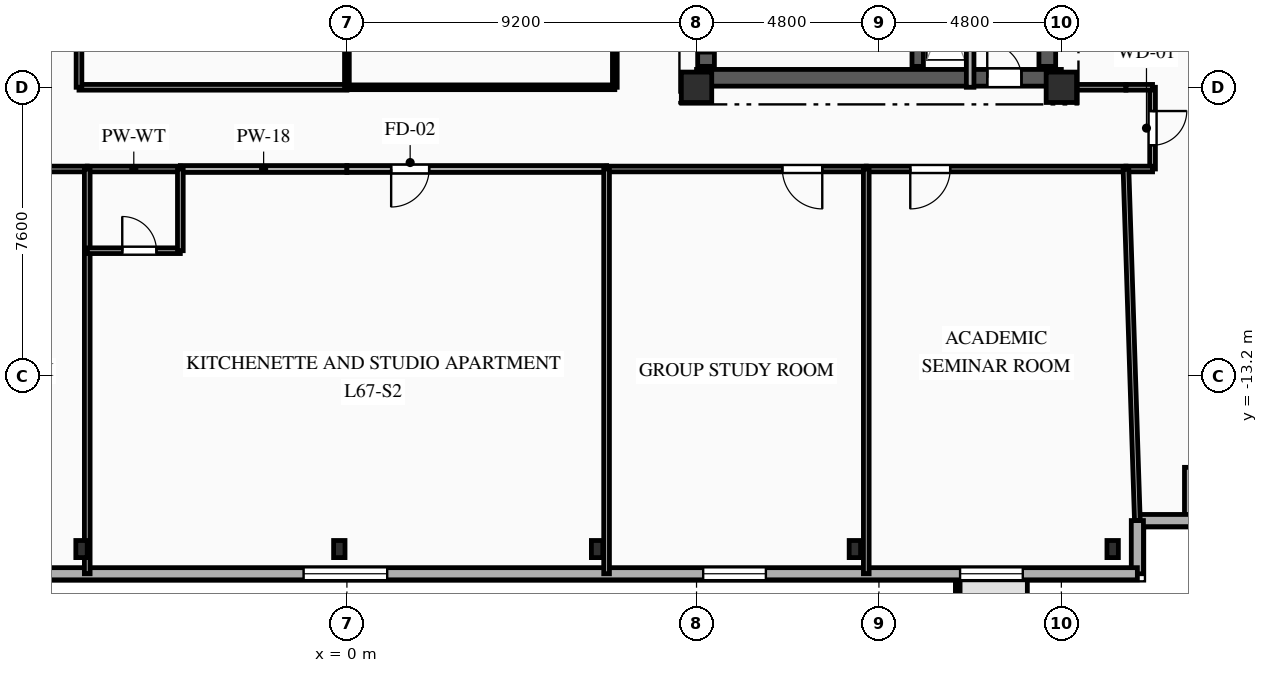
"""IFC4 building model, lengths in metres.
Left out: names, types, materials, properties, quantities, classifications, styles, units other than length and angle.
Written with IfcOpenShell. Run it as: python <this file> out.ifc"""

import sys

from ifc_helpers import new_model, si_unit, direction, frame, frame_2d, origin, origin_2d, place, context, subcontext, project, spatial, rectangle, i_section, extrude, element, fill, save


model = new_model("IFC4")
c1 = context("Model", 3, precision=1e-05, world=origin(), true_north=direction((0.0, 1.0)))
c2 = subcontext(c1, "Body", "Model", "MODEL_VIEW")
j1 = project(units=[si_unit("LENGTHUNIT", "METRE"), si_unit("PLANEANGLEUNIT", "RADIAN")], contexts=[c1])
p1 = place(None, origin())
s1 = spatial("IfcSite", under=j1, at=p1, CompositionType="ELEMENT")
p2 = place(p1, origin())
s2 = spatial("IfcBuilding", under=s1, at=p2, CompositionType="ELEMENT")
p3 = place(p2, frame((0.0, 0.0, 238.35)))
s3 = spatial("IfcBuildingStorey", under=s2, at=p3, CompositionType="ELEMENT", Elevation=238.35)
for number, where, z_axis, x_axis in (
    (1, (9.2, -5.6, 0.0), (0.0, 0.0, 1.0), (1.0, 0.0, 0.0)),
    (2, (18.8, -5.6, 0.0), (0.0, 0.0, 1.0), (1.0, 0.0, 0.0)),
):
    element("IfcColumn", number, at=place(p3, frame(where, z_axis=z_axis, x_axis=x_axis)), inside=s3, PredefinedType="COLUMN", context=c2, shape_type="SweptSolid", body=[
        extrude(rectangle(XDim=0.8, YDim=0.8, at=origin_2d()), origin(), (0.0, 0.0, 1.0), 3.35),
    ])
for number, where, z_axis, x_axis in (
    (3, (-6.983, -17.75, 0.0), (0.0, 0.0, 1.0), (1.0, 0.0, 0.0)),
    (4, (-0.2, -17.75, 0.0), (0.0, 0.0, 1.0), (1.0, 0.0, 0.0)),
    (5, (6.583, -17.75, 0.0), (0.0, 0.0, 1.0), (1.0, 0.0, 0.0)),
    (6, (13.367, -17.75, 0.0), (0.0, 0.0, 1.0), (1.0, 0.0, 0.0)),
    (7, (20.15, -17.75, 0.0), (0.0, 0.0, 1.0), (1.0, 0.0, 0.0)),
):
    element("IfcColumn", number, at=place(p3, frame(where, z_axis=z_axis, x_axis=x_axis)), inside=s3, PredefinedType="COLUMN", context=c2, shape_type="SweptSolid", body=[
        extrude(i_section(OverallWidth=0.3, OverallDepth=0.45, WebThickness=0.014, FlangeThickness=0.026, FilletRadius=0.027, at=origin_2d()), origin(), (0.0, 0.0, 1.0), 3.35),
    ])
for number, where, z_axis, x_axis in (
    (8, (22.2, -15.6, 0.0), (0.0, 0.0, 1.0), (0.0, -1.0, 0.0)),
    (9, (22.2, -17.0, 0.0), (0.0, 0.0, 1.0), (-1.0, 0.0, 0.0)),
    (10, (20.8, -17.0, 0.0), (0.0, 0.0, 1.0), (0.0, -1.0, 0.0)),
):
    element("IfcWall", number, at=place(p3, frame(where, z_axis=z_axis, x_axis=x_axis)), inside=s3, PredefinedType="SOLIDWALL", context=c2, shape_type="SweptSolid", body=[
        extrude(rectangle(XDim=1.4, YDim=0.32, at=frame_2d((0.7, 0.0))), origin(), (0.0, 0.0, 1.0), 3.04),
    ])
p4 = place(p3, frame((20.8, -18.4, 0.0), z_axis=(0.0, 0.0, 1.0), x_axis=(-1.0, 0.0, 0.0)))
e11 = element("IfcWall", 11, at=p4, inside=s3, PredefinedType="SOLIDWALL", context=c2, shape_type="SweptSolid", body=[
    extrude(rectangle(XDim=42.0, YDim=0.32, at=frame_2d((21.0, 0.0))), origin(), (0.0, 0.0, 1.0), 3.04),
])
p5 = place(p4, frame((3.015, 0.0, 0.85)))
e12 = element("IfcOpeningElement", 12, at=p5, cuts=e11, PredefinedType="OPENING", context=c2, shape_type="SweptSolid", body=[
    extrude(rectangle(XDim=1.65, YDim=1.85, at=frame_2d((0.825, 0.925))), frame((0.0, 0.17, 0.0), z_axis=(0.0, -1.0, 0.0), x_axis=(1.0, 0.0, 0.0)), (0.0, 0.0, 1.0), 0.34),
])
p6 = place(p4, frame((9.775, 0.0, 0.85)))
e13 = element("IfcOpeningElement", 13, at=p6, cuts=e11, PredefinedType="OPENING", context=c2, shape_type="SweptSolid", body=[
    extrude(rectangle(XDim=1.65, YDim=1.85, at=frame_2d((0.825, 0.925))), frame((0.0, 0.17, 0.0), z_axis=(0.0, -1.0, 0.0), x_axis=(1.0, 0.0, 0.0)), (0.0, 0.0, 1.0), 0.34),
])
p7 = place(p4, frame((19.74, 0.0, 0.85)))
e14 = element("IfcOpeningElement", 14, at=p7, cuts=e11, PredefinedType="OPENING", context=c2, shape_type="SweptSolid", body=[
    extrude(rectangle(XDim=2.2, YDim=1.85, at=frame_2d((1.1, 0.925))), frame((0.0, 0.17, 0.0), z_axis=(0.0, -1.0, 0.0), x_axis=(1.0, 0.0, 0.0)), (0.0, 0.0, 1.0), 0.34),
])
p8 = place(p4, frame((30.255, 0.0, 0.85)))
e15 = element("IfcOpeningElement", 15, at=p8, cuts=e11, PredefinedType="OPENING", context=c2, shape_type="SweptSolid", body=[
    extrude(rectangle(XDim=1.65, YDim=1.85, at=frame_2d((0.825, 0.925))), frame((0.0, 0.17, 0.0), z_axis=(0.0, -1.0, 0.0), x_axis=(1.0, 0.0, 0.0)), (0.0, 0.0, 1.0), 0.34),
])
p9 = place(p4, frame((37.095, 0.0, 0.85)))
e16 = element("IfcOpeningElement", 16, at=p9, cuts=e11, PredefinedType="OPENING", context=c2, shape_type="SweptSolid", body=[
    extrude(rectangle(XDim=1.65, YDim=1.85, at=frame_2d((0.825, 0.925))), frame((0.0, 0.17, 0.0), z_axis=(0.0, -1.0, 0.0), x_axis=(1.0, 0.0, 0.0)), (0.0, 0.0, 1.0), 0.34),
])
p10 = place(p3, frame((9.2, -5.35, 0.0), z_axis=(0.0, 0.0, 1.0), x_axis=(1.0, 0.0, 0.0)))
e17 = element("IfcWall", 17, at=p10, inside=s3, PredefinedType="SHEAR", context=c2, shape_type="SweptSolid", body=[
    extrude(rectangle(XDim=9.6, YDim=0.44, at=frame_2d((4.8, 0.0))), origin(), (0.0, 0.0, 1.0), 3.04),
])
p11 = place(p10, frame((7.65, 0.0, 0.0)))
e18 = element("IfcOpeningElement", 18, at=p11, cuts=e17, PredefinedType="OPENING", context=c2, shape_type="SweptSolid", body=[
    extrude(rectangle(XDim=0.9, YDim=2.1, at=frame_2d((0.45, 1.05))), frame((0.0, 0.23, 0.0), z_axis=(0.0, -1.0, 0.0), x_axis=(1.0, 0.0, 0.0)), (0.0, 0.0, 1.0), 0.46),
])
p12 = place(p3, frame((9.45, -5.05, 0.0), z_axis=(0.0, 0.0, 1.0), x_axis=(0.0, 1.0, 0.0)))
e19 = element("IfcWall", 19, at=p12, inside=s3, PredefinedType="SHEAR", context=c2, shape_type="SweptSolid", body=[
    extrude(rectangle(XDim=10.1, YDim=0.44, at=frame_2d((5.05, 0.0))), origin(), (0.0, 0.0, 1.0), 3.04),
])
p13 = place(p12, frame((7.15, 0.0, 0.0)))
e20 = element("IfcOpeningElement", 20, at=p13, cuts=e19, PredefinedType="OPENING", context=c2, shape_type="SweptSolid", body=[
    extrude(rectangle(XDim=0.9, YDim=2.1, at=frame_2d((0.45, 1.05))), frame((0.0, 0.23, 0.0), z_axis=(0.0, -1.0, 0.0), x_axis=(1.0, 0.0, 0.0)), (0.0, 0.0, 1.0), 0.46),
])
p14 = place(p12, frame((2.4, 0.0, 0.0)))
e21 = element("IfcOpeningElement", 21, at=p14, cuts=e19, PredefinedType="OPENING", context=c2, shape_type="SweptSolid", body=[
    extrude(rectangle(XDim=1.2, YDim=2.15, at=frame_2d((0.6, 1.075))), frame((0.0, 0.23, 0.0), z_axis=(0.0, -1.0, 0.0), x_axis=(1.0, 0.0, 0.0)), (0.0, 0.0, 1.0), 0.46),
])
p15 = place(p12, frame((0.35, 0.0, 0.0)))
e22 = element("IfcOpeningElement", 22, at=p15, cuts=e19, PredefinedType="OPENING", context=c2, shape_type="SweptSolid", body=[
    extrude(rectangle(XDim=0.9, YDim=2.1, at=frame_2d((0.45, 1.05))), frame((0.0, 0.23, 0.0), z_axis=(0.0, -1.0, 0.0), x_axis=(1.0, 0.0, 0.0)), (0.0, 0.0, 1.0), 0.46),
])
p16 = place(p3, frame((18.43, -5.05, 0.0), z_axis=(0.0, 0.0, 1.0), x_axis=(0.0, 1.0, 0.0)))
e23 = element("IfcWall", 23, at=p16, inside=s3, PredefinedType="SHEAR", context=c2, shape_type="SweptSolid", body=[
    extrude(rectangle(XDim=10.1, YDim=0.44, at=frame_2d((5.05, 0.0))), origin(), (0.0, 0.0, 1.0), 3.04),
])
p17 = place(p3, frame((15.02, -5.05, 0.0), z_axis=(0.0, 0.0, 1.0), x_axis=(0.0, 1.0, 0.0)))
e24 = element("IfcWall", 24, at=p17, inside=s3, PredefinedType="SHEAR", context=c2, shape_type="SweptSolid", body=[
    extrude(rectangle(XDim=10.1, YDim=0.3, at=frame_2d((5.05, 0.0))), origin(), (0.0, 0.0, 1.0), 3.04),
])
p18 = place(p3, frame((16.4, -2.11, 0.0), z_axis=(0.0, 0.0, 1.0), x_axis=(0.0, -1.0, 0.0)))
e25 = element("IfcWall", 25, at=p18, inside=s3, PredefinedType="PARTITIONING", context=c2, shape_type="SweptSolid", body=[
    extrude(rectangle(XDim=3.49, YDim=0.2, at=frame_2d((1.745, 0.0))), origin(), (0.0, 0.0, 1.0), 3.04),
])
p19 = place(p3, frame((-6.833, -7.75, 0.0), z_axis=(0.0, 0.0, 1.0), x_axis=(-1.0, 0.0, 0.0)))
e26 = element("IfcWall", 26, at=p19, inside=s3, PredefinedType="PARTITIONING", context=c2, shape_type="SweptSolid", body=[
    extrude(rectangle(XDim=6.833, YDim=0.15, at=frame_2d((3.417, 0.0))), origin(), (0.0, 0.0, 1.0), 3.04),
])
p20 = place(p19, frame((4.625, 0.0, 0.0)))
e27 = element("IfcOpeningElement", 27, at=p20, cuts=e26, PredefinedType="OPENING", context=c2, shape_type="SweptSolid", body=[
    extrude(rectangle(XDim=1.05, YDim=2.15, at=frame_2d((0.525, 1.075))), frame((0.0, 0.085, 0.0), z_axis=(0.0, -1.0, 0.0), x_axis=(1.0, 0.0, 0.0)), (0.0, 0.0, 1.0), 0.17),
])
p21 = place(p3, frame((0.0, -7.75, 0.0), z_axis=(0.0, 0.0, 1.0), x_axis=(-1.0, 0.0, 0.0)))
e28 = element("IfcWall", 28, at=p21, inside=s3, PredefinedType="PARTITIONING", context=c2, shape_type="SweptSolid", body=[
    extrude(rectangle(XDim=4.383, YDim=0.18, at=frame_2d((2.191, 0.0))), origin(), (0.0, 0.0, 1.0), 3.04),
])
p22 = place(p3, frame((-4.383, -7.75, 0.0), z_axis=(0.0, 0.0, 1.0), x_axis=(-1.0, 0.0, 0.0)))
e29 = element("IfcWall", 29, at=p22, inside=s3, PredefinedType="PLUMBINGWALL", context=c2, shape_type="SweptSolid", body=[
    extrude(rectangle(XDim=2.45, YDim=0.15, at=frame_2d((1.225, 0.0))), origin(), (0.0, 0.0, 1.0), 3.04),
])
p23 = place(p3, frame((-7.05, -5.6, 0.0), z_axis=(0.0, 0.0, 1.0), x_axis=(1.0, 0.0, 0.0)))
e30 = element("IfcWall", 30, at=p23, inside=s3, PredefinedType="PARTITIONING", context=c2, shape_type="SweptSolid", body=[
    extrude(rectangle(XDim=7.05, YDim=0.15, at=frame_2d((3.525, 0.0))), origin(), (0.0, 0.0, 1.0), 2.525),
])
p24 = place(p3, frame((21.2, -5.6, 0.0), z_axis=(0.0, 0.0, 1.0), x_axis=(0.0, -1.0, 0.0)))
e31 = element("IfcWall", 31, at=p24, inside=s3, PredefinedType="PARTITIONING", context=c2, shape_type="SweptSolid", body=[
    extrude(rectangle(XDim=2.15, YDim=0.15, at=frame_2d((1.075, 0.0))), origin(), (0.0, 0.0, 1.0), 3.04),
])
p25 = place(p24, frame((0.625, 0.0, 0.0)))
e32 = element("IfcOpeningElement", 32, at=p25, cuts=e31, PredefinedType="OPENING", context=c2, shape_type="SweptSolid", body=[
    extrude(rectangle(XDim=0.9, YDim=2.1, at=frame_2d((0.45, 1.05))), frame((0.0, 0.085, 0.0), z_axis=(0.0, -1.0, 0.0), x_axis=(1.0, 0.0, 0.0)), (0.0, 0.0, 1.0), 0.17),
])
p26 = place(p3, frame((18.8, -5.6, 0.0), z_axis=(0.0, 0.0, 1.0), x_axis=(1.0, 0.0, 0.0)))
e33 = element("IfcWall", 33, at=p26, inside=s3, PredefinedType="PARTITIONING", context=c2, shape_type="SweptSolid", body=[
    extrude(rectangle(XDim=1.7, YDim=0.15, at=frame_2d((0.85, 0.0))), origin(), (0.0, 0.0, 1.0), 3.04),
])
for number, where, z_axis, x_axis in (
    (34, (20.5, -5.6, 0.0), (0.0, 0.0, 1.0), (1.0, 0.0, 0.0)),
    (35, (21.2, -7.75, 0.0), (0.0, 0.0, 1.0), (-1.0, 0.0, 0.0)),
):
    element("IfcWall", number, at=place(p3, frame(where, z_axis=z_axis, x_axis=x_axis)), inside=s3, PredefinedType="PARTITIONING", context=c2, shape_type="SweptSolid", body=[
        extrude(rectangle(XDim=0.7, YDim=0.15, at=frame_2d((0.35, 0.0))), origin(), (0.0, 0.0, 1.0), 3.04),
    ])
p27 = place(p3, frame((6.833, -7.75, 0.0), z_axis=(0.0, 0.0, 1.0), x_axis=(-1.0, 0.0, 0.0)))
e36 = element("IfcWall", 36, at=p27, inside=s3, PredefinedType="PARTITIONING", context=c2, shape_type="SweptSolid", body=[
    extrude(rectangle(XDim=6.833, YDim=0.18, at=frame_2d((3.417, 0.0))), origin(), (0.0, 0.0, 1.0), 3.04),
])
p28 = place(p27, frame((4.669, 0.0, 0.0)))
e37 = element("IfcOpeningElement", 37, at=p28, cuts=e36, PredefinedType="OPENING", context=c2, shape_type="SweptSolid", body=[
    extrude(rectangle(XDim=1.0, YDim=2.15, at=frame_2d((0.5, 1.075))), frame((0.0, 0.1, 0.0), z_axis=(0.0, -1.0, 0.0), x_axis=(1.0, 0.0, 0.0)), (0.0, 0.0, 1.0), 0.2),
])
p29 = place(p3, frame((13.667, -7.75, 0.0), z_axis=(0.0, 0.0, 1.0), x_axis=(-1.0, 0.0, 0.0)))
e38 = element("IfcWall", 38, at=p29, inside=s3, PredefinedType="PARTITIONING", context=c2, shape_type="SweptSolid", body=[
    extrude(rectangle(XDim=6.833, YDim=0.15, at=frame_2d((3.417, 0.0))), origin(), (0.0, 0.0, 1.0), 3.04),
])
p30 = place(p29, frame((1.158, 0.0, 0.0)))
e39 = element("IfcOpeningElement", 39, at=p30, cuts=e38, PredefinedType="OPENING", context=c2, shape_type="SweptSolid", body=[
    extrude(rectangle(XDim=1.05, YDim=2.15, at=frame_2d((0.525, 1.075))), frame((0.0, 0.085, 0.0), z_axis=(0.0, -1.0, 0.0), x_axis=(1.0, 0.0, 0.0)), (0.0, 0.0, 1.0), 0.17),
])
p31 = place(p3, frame((20.5, -7.75, 0.0), z_axis=(0.0, 0.0, 1.0), x_axis=(-1.0, 0.0, 0.0)))
e40 = element("IfcWall", 40, at=p31, inside=s3, PredefinedType="PARTITIONING", context=c2, shape_type="SweptSolid", body=[
    extrude(rectangle(XDim=6.833, YDim=0.15, at=frame_2d((3.417, 0.0))), origin(), (0.0, 0.0, 1.0), 3.04),
])
p32 = place(p31, frame((4.625, 0.0, 0.0)))
e41 = element("IfcOpeningElement", 41, at=p32, cuts=e40, PredefinedType="OPENING", context=c2, shape_type="SweptSolid", body=[
    extrude(rectangle(XDim=1.05, YDim=2.15, at=frame_2d((0.525, 1.075))), frame((0.0, 0.085, 0.0), z_axis=(0.0, -1.0, 0.0), x_axis=(1.0, 0.0, 0.0)), (0.0, 0.0, 1.0), 0.17),
])
p33 = place(p3, frame((0.0, -5.6, 0.0), z_axis=(0.0, 0.0, 1.0), x_axis=(1.0, 0.0, 0.0)))
e42 = element("IfcWall", 42, at=p33, inside=s3, PredefinedType="PARTITIONING", context=c2, shape_type="SweptSolid", body=[
    extrude(rectangle(XDim=7.05, YDim=0.125, at=frame_2d((3.525, 0.0))), origin(), (0.0, 0.0, 1.0), 2.525),
])
p34 = place(p3, frame((-7.05, 8.5, 0.0), z_axis=(0.0, 0.0, 1.0), x_axis=(0.0, -1.0, 0.0)))
e43 = element("IfcWall", 43, at=p34, inside=s3, PredefinedType="PARTITIONING", context=c2, shape_type="SweptSolid", body=[
    extrude(rectangle(XDim=14.1, YDim=0.15, at=frame_2d((7.05, 0.0))), origin(), (0.0, 0.0, 1.0), 3.04),
])
p35 = place(p34, frame((8.074, 0.0, 0.0)))
e44 = element("IfcOpeningElement", 44, at=p35, cuts=e43, PredefinedType="OPENING", context=c2, shape_type="SweptSolid", body=[
    extrude(rectangle(XDim=0.95, YDim=2.1, at=frame_2d((0.475, 1.05))), frame((0.0, 0.085, 0.0), z_axis=(0.0, -1.0, 0.0), x_axis=(1.0, 0.0, 0.0)), (0.0, 0.0, 1.0), 0.17),
])
p36 = place(p3, frame((7.05, -5.6, 0.0), z_axis=(0.0, 0.0, 1.0), x_axis=(0.0, 1.0, 0.0)))
e45 = element("IfcWall", 45, at=p36, inside=s3, PredefinedType="PARTITIONING", context=c2, shape_type="SweptSolid", body=[
    extrude(rectangle(XDim=14.1, YDim=0.125, at=frame_2d((7.05, 0.0))), origin(), (0.0, 0.0, 1.0), 3.04),
])
p37 = place(p36, frame((5.076, 0.0, 0.0)))
e46 = element("IfcOpeningElement", 46, at=p37, cuts=e45, PredefinedType="OPENING", context=c2, shape_type="SweptSolid", body=[
    extrude(rectangle(XDim=0.95, YDim=2.1, at=frame_2d((0.475, 1.05))), frame((0.0, 0.073, 0.0), z_axis=(0.0, -1.0, 0.0), x_axis=(1.0, 0.0, 0.0)), (0.0, 0.0, 1.0), 0.145),
])
p38 = place(p3, frame((20.8, -17.0, 0.0), z_axis=(0.0, 0.0, 1.0), x_axis=(-0.032420659042, 0.99947431226, 0.0)))
e47 = element("IfcWall", 47, at=p38, inside=s3, PredefinedType="PARTITIONING", context=c2, shape_type="SweptSolid", body=[
    extrude(rectangle(XDim=9.255, YDim=0.15, at=frame_2d((4.627, 0.0))), origin(), (0.0, 0.0, 1.0), 3.04),
])
p39 = place(p3, frame((-6.833, -9.9, 0.0), z_axis=(0.0, 0.0, 1.0), x_axis=(0.0, -1.0, 0.0)))
e48 = element("IfcWall", 48, at=p39, inside=s3, PredefinedType="PARTITIONING", context=c2, shape_type="SweptSolid", body=[
    extrude(rectangle(XDim=8.5, YDim=0.15, at=frame_2d((4.25, 0.0))), origin(), (0.0, 0.0, 1.0), 2.665),
])
p40 = place(p3, frame((-6.833, -7.75, 0.0), z_axis=(0.0, 0.0, 1.0), x_axis=(0.0, -1.0, 0.0)))
e49 = element("IfcWall", 49, at=p40, inside=s3, PredefinedType="PLUMBINGWALL", context=c2, shape_type="SweptSolid", body=[
    extrude(rectangle(XDim=2.15, YDim=0.15, at=frame_2d((1.075, 0.0))), origin(), (0.0, 0.0, 1.0), 3.04),
])
p41 = place(p3, frame((-6.833, -9.9, 0.0), z_axis=(0.0, 0.0, 1.0), x_axis=(1.0, 0.0, 0.0)))
e50 = element("IfcWall", 50, at=p41, inside=s3, PredefinedType="PLUMBINGWALL", context=c2, shape_type="SweptSolid", body=[
    extrude(rectangle(XDim=2.45, YDim=0.15, at=frame_2d((1.225, 0.0))), origin(), (0.0, 0.0, 1.0), 3.04),
])
p42 = place(p41, frame((0.921, 0.0, 0.0)))
e51 = element("IfcOpeningElement", 51, at=p42, cuts=e50, PredefinedType="OPENING", context=c2, shape_type="SweptSolid", body=[
    extrude(rectangle(XDim=0.9, YDim=2.1, at=frame_2d((0.45, 1.05))), frame((0.0, 0.085, 0.0), z_axis=(0.0, -1.0, 0.0), x_axis=(1.0, 0.0, 0.0)), (0.0, 0.0, 1.0), 0.17),
])
p43 = place(p3, frame((-4.383, -9.9, 0.0), z_axis=(0.0, 0.0, 1.0), x_axis=(0.0, 1.0, 0.0)))
e52 = element("IfcWall", 52, at=p43, inside=s3, PredefinedType="PLUMBINGWALL", context=c2, shape_type="SweptSolid", body=[
    extrude(rectangle(XDim=2.15, YDim=0.15, at=frame_2d((1.075, 0.0))), origin(), (0.0, 0.0, 1.0), 3.04),
])
p44 = place(p3, frame((6.833, -7.75, 0.0), z_axis=(0.0, 0.0, 1.0), x_axis=(0.0, -1.0, 0.0)))
e53 = element("IfcWall", 53, at=p44, inside=s3, PredefinedType="PARTITIONING", context=c2, shape_type="SweptSolid", body=[
    extrude(rectangle(XDim=10.65, YDim=0.15, at=frame_2d((5.325, 0.0))), origin(), (0.0, 0.0, 1.0), 2.665),
])
p45 = place(p3, frame((13.667, -7.75, 0.0), z_axis=(0.0, 0.0, 1.0), x_axis=(0.0, -1.0, 0.0)))
e54 = element("IfcWall", 54, at=p45, inside=s3, PredefinedType="PARTITIONING", context=c2, shape_type="SweptSolid", body=[
    extrude(rectangle(XDim=10.65, YDim=0.15, at=frame_2d((5.325, 0.0))), origin(), (0.0, 0.0, 1.0), 3.04),
])
p46 = place(p3, frame((0.0, 8.5, 0.0), z_axis=(0.0, 0.0, 1.0), x_axis=(0.0, -1.0, 0.0)))
e55 = element("IfcWall", 55, at=p46, inside=s3, PredefinedType="PARTITIONING", context=c2, shape_type="SweptSolid", body=[
    extrude(rectangle(XDim=14.1, YDim=0.125, at=frame_2d((7.05, 0.0))), origin(), (0.0, 0.0, 1.0), 3.04),
])
p47 = place(p5, origin())
e56 = element("IfcWindow", 56, at=p47, inside=s3, PartitioningType="SINGLE_PANEL", PredefinedType="WINDOW", context=c2, shape_type="SweptSolid", body=[
    extrude(rectangle(XDim=1.65, YDim=1.85, at=frame_2d((0.825, 0.925))), frame((0.0, 0.03, 0.0), z_axis=(0.0, -1.0, 0.0), x_axis=(1.0, 0.0, 0.0)), (0.0, 0.0, 1.0), 0.06),
])
fill(e12, e56)
p48 = place(p6, origin())
e57 = element("IfcWindow", 57, at=p48, inside=s3, PartitioningType="SINGLE_PANEL", PredefinedType="WINDOW", context=c2, shape_type="SweptSolid", body=[
    extrude(rectangle(XDim=1.65, YDim=1.85, at=frame_2d((0.825, 0.925))), frame((0.0, 0.03, 0.0), z_axis=(0.0, -1.0, 0.0), x_axis=(1.0, 0.0, 0.0)), (0.0, 0.0, 1.0), 0.06),
])
fill(e13, e57)
p49 = place(p7, origin())
e58 = element("IfcWindow", 58, at=p49, inside=s3, PartitioningType="SINGLE_PANEL", PredefinedType="WINDOW", context=c2, shape_type="SweptSolid", body=[
    extrude(rectangle(XDim=2.2, YDim=1.85, at=frame_2d((1.1, 0.925))), frame((0.0, 0.03, 0.0), z_axis=(0.0, -1.0, 0.0), x_axis=(1.0, 0.0, 0.0)), (0.0, 0.0, 1.0), 0.06),
])
fill(e14, e58)
p50 = place(p11, origin())
e59 = element("IfcDoor", 59, at=p50, inside=s3, OperationType="SINGLE_SWING_LEFT", PredefinedType="DOOR", context=c2, shape_type="SweptSolid", body=[
    extrude(rectangle(XDim=0.9, YDim=2.1, at=frame_2d((0.45, 1.05))), frame((0.0, 0.025, 0.0), z_axis=(0.0, -1.0, 0.0), x_axis=(1.0, 0.0, 0.0)), (0.0, 0.0, 1.0), 0.05),
])
fill(e18, e59)
p51 = place(p15, origin())
e60 = element("IfcDoor", 60, at=p51, inside=s3, OperationType="SINGLE_SWING_RIGHT", PredefinedType="DOOR", context=c2, shape_type="SweptSolid", body=[
    extrude(rectangle(XDim=0.9, YDim=2.1, at=frame_2d((0.45, 1.05))), frame((0.0, 0.025, 0.0), z_axis=(0.0, -1.0, 0.0), x_axis=(1.0, 0.0, 0.0)), (0.0, 0.0, 1.0), 0.05),
])
fill(e22, e60)
p52 = place(p25, origin())
e61 = element("IfcDoor", 61, at=p52, inside=s3, OperationType="SINGLE_SWING_LEFT", PredefinedType="DOOR", context=c2, shape_type="SweptSolid", body=[
    extrude(rectangle(XDim=0.9, YDim=2.1, at=frame_2d((0.45, 1.05))), frame((0.0, 0.025, 0.0), z_axis=(0.0, -1.0, 0.0), x_axis=(1.0, 0.0, 0.0)), (0.0, 0.0, 1.0), 0.05),
])
fill(e32, e61)
p53 = place(p28, origin())
e62 = element("IfcDoor", 62, at=p53, inside=s3, OperationType="SINGLE_SWING_RIGHT", PredefinedType="DOOR", context=c2, shape_type="SweptSolid", body=[
    extrude(rectangle(XDim=1.0, YDim=2.15, at=frame_2d((0.5, 1.075))), frame((0.0, 0.025, 0.0), z_axis=(0.0, -1.0, 0.0), x_axis=(1.0, 0.0, 0.0)), (0.0, 0.0, 1.0), 0.05),
])
fill(e37, e62)
p54 = place(p30, origin())
e63 = element("IfcDoor", 63, at=p54, inside=s3, OperationType="SINGLE_SWING_LEFT", PredefinedType="DOOR", context=c2, shape_type="SweptSolid", body=[
    extrude(rectangle(XDim=1.05, YDim=2.15, at=frame_2d((0.525, 1.075))), frame((0.0, 0.025, 0.0), z_axis=(0.0, -1.0, 0.0), x_axis=(1.0, 0.0, 0.0)), (0.0, 0.0, 1.0), 0.05),
])
fill(e39, e63)
p55 = place(p32, origin())
e64 = element("IfcDoor", 64, at=p55, inside=s3, OperationType="SINGLE_SWING_RIGHT", PredefinedType="DOOR", context=c2, shape_type="SweptSolid", body=[
    extrude(rectangle(XDim=1.05, YDim=2.15, at=frame_2d((0.525, 1.075))), frame((0.0, 0.025, 0.0), z_axis=(0.0, -1.0, 0.0), x_axis=(1.0, 0.0, 0.0)), (0.0, 0.0, 1.0), 0.05),
])
fill(e41, e64)
p56 = place(p42, origin())
e65 = element("IfcDoor", 65, at=p56, inside=s3, OperationType="SINGLE_SWING_LEFT", PredefinedType="DOOR", context=c2, shape_type="SweptSolid", body=[
    extrude(rectangle(XDim=0.9, YDim=2.1, at=frame_2d((0.45, 1.05))), frame((0.0, 0.025, 0.0), z_axis=(0.0, -1.0, 0.0), x_axis=(1.0, 0.0, 0.0)), (0.0, 0.0, 1.0), 0.05),
])
fill(e51, e65)
save(model, sys.argv[1])
